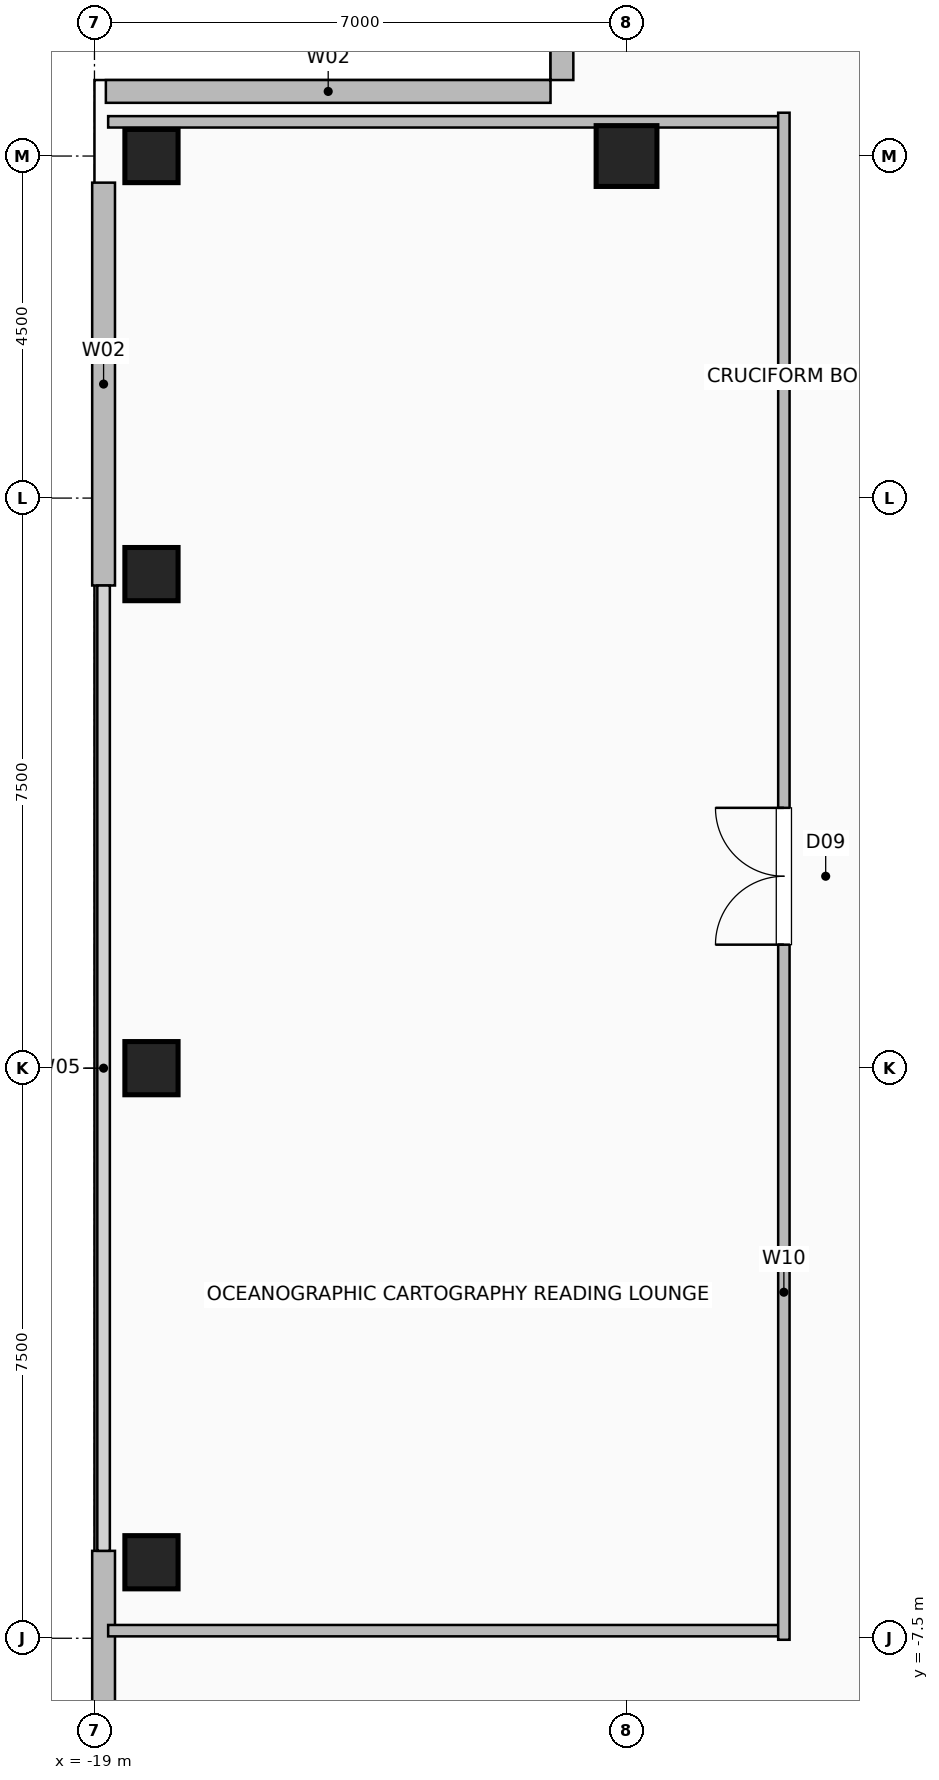
"""IFC4 building model, lengths in metres.
Left out: names, types, materials, properties, quantities, classifications, styles, units other than length and angle.
Written with IfcOpenShell. Run it as: python <this file> out.ifc"""

import sys

from ifc_helpers import new_model, si_unit, direction, frame, frame_2d, origin, origin_2d, place, context, subcontext, project, spatial, rectangle, hollow_rectangle, extrude, element, fill, save


model = new_model("IFC4")
c1 = context("Model", 3, precision=1e-05, world=origin(), true_north=direction((0.0, 1.0)))
c2 = subcontext(c1, "Body", "Model", "MODEL_VIEW")
j1 = project(units=[si_unit("LENGTHUNIT", "METRE"), si_unit("PLANEANGLEUNIT", "RADIAN")], contexts=[c1])
p1 = place(None, origin())
s1 = spatial("IfcSite", under=j1, at=p1, CompositionType="ELEMENT")
p2 = place(p1, origin())
s2 = spatial("IfcBuilding", under=s1, at=p2, CompositionType="ELEMENT")
p3 = place(p2, frame((0.0, 0.0, 268.4)))
s3 = spatial("IfcBuildingStorey", under=s2, at=p3, CompositionType="ELEMENT", Elevation=268.4)
for number, where, z_axis, x_axis in (
    (1, (-18.25, -6.5, 0.0), (0.0, 0.0, 1.0), (1.0, 0.0, 0.0)),
    (2, (-18.25, 0.0, 0.0), (0.0, 0.0, 1.0), (1.0, 0.0, 0.0)),
    (3, (-18.25, 6.5, 0.0), (0.0, 0.0, 1.0), (1.0, 0.0, 0.0)),
    (4, (-18.25, 12.0, 0.0), (0.0, 0.0, 1.0), (1.0, 0.0, 0.0)),
):
    element("IfcColumn", number, at=place(p3, frame(where, z_axis=z_axis, x_axis=x_axis)), inside=s3, PredefinedType="COLUMN", context=c2, shape_type="SweptSolid", body=[
        extrude(hollow_rectangle(XDim=0.7, YDim=0.7, WallThickness=0.035, at=origin_2d()), origin(), (0.0, 0.0, 1.0), 3.6),
    ])
p4 = place(p3, frame((-12.0, 12.0, 0.0), z_axis=(0.0, 0.0, 1.0), x_axis=(1.0, 0.0, 0.0)))
e5 = element("IfcColumn", 5, at=p4, inside=s3, PredefinedType="COLUMN", context=c2, shape_type="SweptSolid", body=[
    extrude(hollow_rectangle(XDim=0.8, YDim=0.8, WallThickness=0.04, at=origin_2d()), origin(), (0.0, 0.0, 1.0), 3.6),
])
for number, where, z_axis, x_axis in (
    (6, (-18.88, -11.65, 0.0), (0.0, 0.0, 1.0), (0.0, 1.0, 0.0)),
    (7, (-18.88, 6.35, 0.0), (0.0, 0.0, 1.0), (0.0, 1.0, 0.0)),
):
    element("IfcWall", number, at=place(p3, frame(where, z_axis=z_axis, x_axis=x_axis)), inside=s3, PredefinedType="SOLIDWALL", context=c2, shape_type="SweptSolid", body=[
        extrude(rectangle(XDim=5.3, YDim=0.3, at=frame_2d((2.65, 0.0))), origin(), (0.0, 0.0, 1.0), 3.36),
    ])
p5 = place(p3, frame((-12.85, 18.85, 0.0), z_axis=(0.0, 0.0, 1.0), x_axis=(0.0, -1.0, 0.0)))
e8 = element("IfcWall", 8, at=p5, inside=s3, PredefinedType="SOLIDWALL", context=c2, shape_type="SweptSolid", body=[
    extrude(rectangle(XDim=5.85, YDim=0.3, at=frame_2d((2.925, 0.0))), origin(), (0.0, 0.0, 1.0), 3.36),
])
p6 = place(p5, frame((2.175, 0.0, 0.9)))
e9 = element("IfcOpeningElement", 9, at=p6, cuts=e8, PredefinedType="OPENING", context=c2, shape_type="SweptSolid", body=[
    extrude(rectangle(XDim=1.5, YDim=1.8, at=frame_2d((0.75, 0.9))), frame((0.0, 0.16, 0.0), z_axis=(0.0, -1.0, 0.0), x_axis=(1.0, 0.0, 0.0)), (0.0, 0.0, 1.0), 0.32),
])
p7 = place(p3, frame((-18.85, 12.85, 0.0), z_axis=(0.0, 0.0, 1.0), x_axis=(1.0, 0.0, 0.0)))
e10 = element("IfcWall", 10, at=p7, inside=s3, PredefinedType="SOLIDWALL", context=c2, shape_type="SweptSolid", body=[
    extrude(rectangle(XDim=5.85, YDim=0.3, at=frame_2d((2.925, 0.0))), origin(), (0.0, 0.0, 1.0), 3.36),
])
for number, where, z_axis, x_axis in (
    (11, (-18.82, -7.4, 0.0), (0.0, 0.0, 1.0), (1.0, 0.0, 0.0)),
    (12, (-18.82, 12.45, 0.0), (0.0, 0.0, 1.0), (1.0, 0.0, 0.0)),
):
    element("IfcWall", number, at=place(p3, frame(where, z_axis=z_axis, x_axis=x_axis)), inside=s3, PredefinedType="PARTITIONING", context=c2, shape_type="SweptSolid", body=[
        extrude(rectangle(XDim=8.89, YDim=0.15, at=frame_2d((4.445, 0.0))), origin(), (0.0, 0.0, 1.0), 3.36),
    ])
p8 = place(p3, frame((-9.93, -7.52, 0.0), z_axis=(0.0, 0.0, 1.0), x_axis=(0.0, 1.0, 0.0)))
e13 = element("IfcWall", 13, at=p8, inside=s3, PredefinedType="PARTITIONING", context=c2, shape_type="SweptSolid", body=[
    extrude(rectangle(XDim=20.09, YDim=0.15, at=frame_2d((10.045, 0.0))), origin(), (0.0, 0.0, 1.0), 3.36),
])
p9 = place(p8, frame((9.145, 0.0, 0.0)))
e14 = element("IfcOpeningElement", 14, at=p9, cuts=e13, PredefinedType="OPENING", context=c2, shape_type="SweptSolid", body=[
    extrude(rectangle(XDim=1.8, YDim=2.08, at=frame_2d((0.9, 1.04))), frame((0.0, 0.085, 0.0), z_axis=(0.0, -1.0, 0.0), x_axis=(1.0, 0.0, 0.0)), (0.0, 0.0, 1.0), 0.17),
])
p10 = place(p9, origin())
e15 = element("IfcDoor", 15, at=p10, inside=s3, OperationType="DOUBLE_DOOR_SINGLE_SWING", PredefinedType="DOOR", context=c2, shape_type="SweptSolid", body=[
    extrude(rectangle(XDim=1.8, YDim=2.08, at=frame_2d((0.9, 1.04))), frame((0.0, 0.025, 0.0), z_axis=(0.0, -1.0, 0.0), x_axis=(1.0, 0.0, 0.0)), (0.0, 0.0, 1.0), 0.05),
])
fill(e14, e15)
save(model, sys.argv[1])
